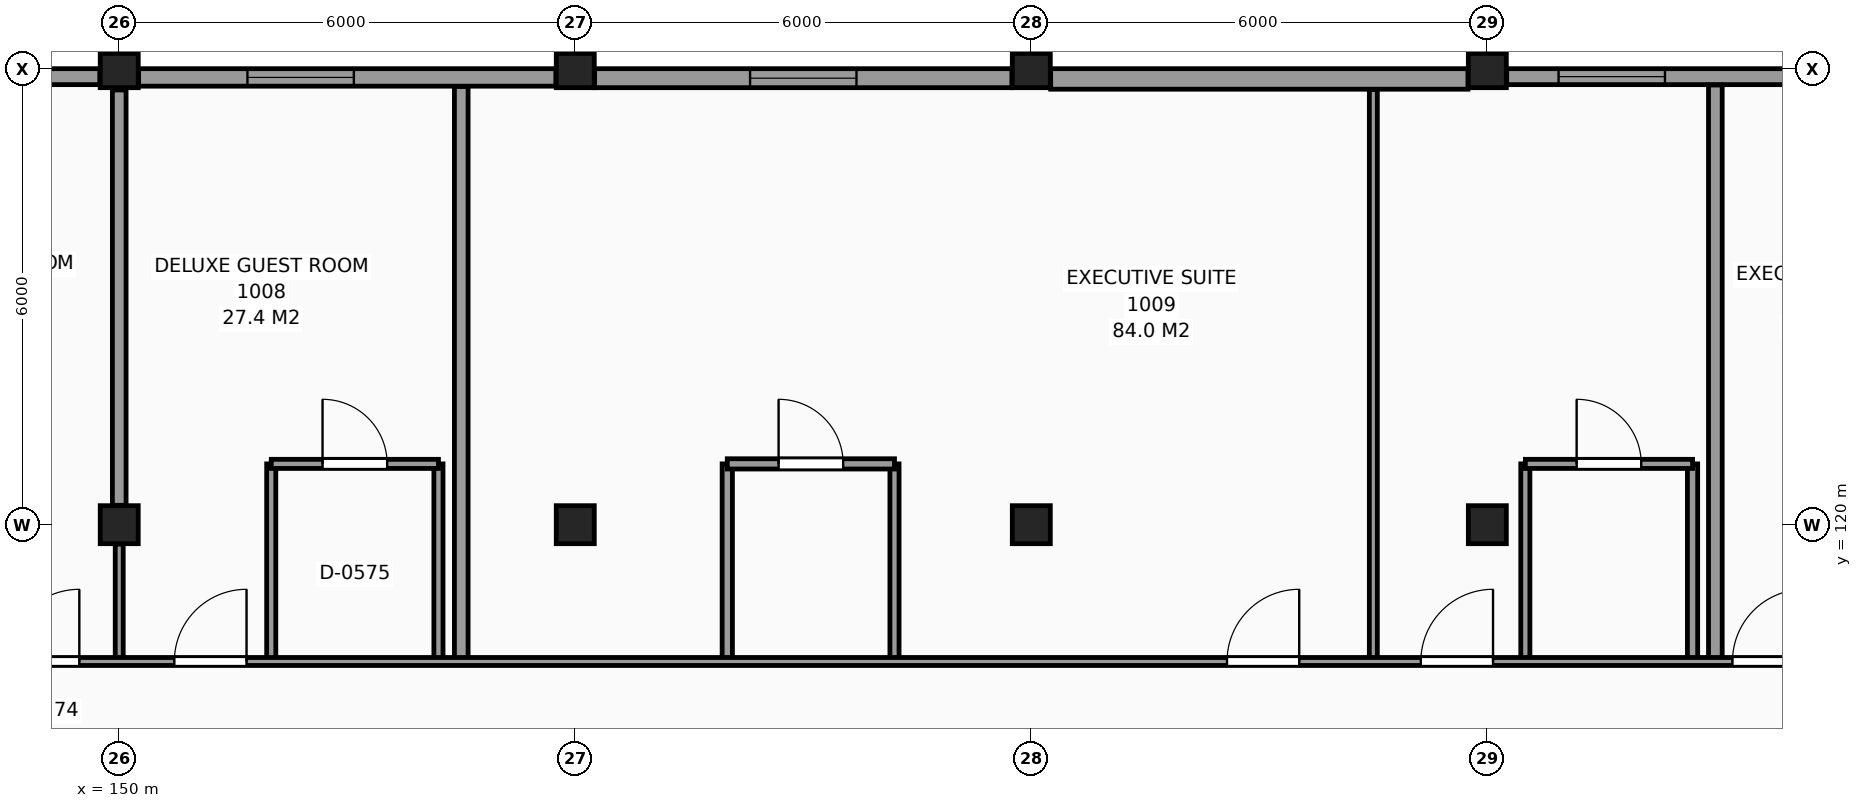
"""IFC4 building model, lengths in metres.
Left out: names, types, materials, properties, quantities, classifications, styles, units other than length and angle.
Written with IfcOpenShell. Run it as: python <this file> out.ifc"""

import sys

from ifc_helpers import new_model, si_unit, direction, frame, frame_2d, origin, origin_2d, place, context, subcontext, project, spatial, rectangle, extrude, element, fill, save


model = new_model("IFC4")
c1 = context("Model", 3, precision=1e-05, world=origin(), true_north=direction((0.0, 1.0)))
c2 = subcontext(c1, "Body", "Model", "MODEL_VIEW")
j1 = project(units=[si_unit("LENGTHUNIT", "METRE"), si_unit("PLANEANGLEUNIT", "RADIAN")], contexts=[c1])
p1 = place(None, origin())
s1 = spatial("IfcSite", under=j1, at=p1, CompositionType="ELEMENT")
p2 = place(p1, origin())
s2 = spatial("IfcBuilding", under=s1, at=p2, CompositionType="ELEMENT")
p3 = place(p2, frame((0.0, 0.0, 41.4)))
s3 = spatial("IfcBuildingStorey", under=s2, at=p3, CompositionType="ELEMENT", Elevation=41.4)
for number, where, z_axis, x_axis in (
    (1, (150.0, 120.0, 0.0), (0.0, 0.0, 1.0), (1.0, 0.0, 0.0)),
    (2, (150.0, 126.0, 0.0), (0.0, 0.0, 1.0), (1.0, 0.0, 0.0)),
    (3, (156.0, 120.0, 0.0), (0.0, 0.0, 1.0), (1.0, 0.0, 0.0)),
    (4, (156.0, 126.0, 0.0), (0.0, 0.0, 1.0), (1.0, 0.0, 0.0)),
    (5, (162.0, 120.0, 0.0), (0.0, 0.0, 1.0), (1.0, 0.0, 0.0)),
    (6, (162.0, 126.0, 0.0), (0.0, 0.0, 1.0), (1.0, 0.0, 0.0)),
    (7, (168.0, 120.0, 0.0), (0.0, 0.0, 1.0), (1.0, 0.0, 0.0)),
    (8, (168.0, 126.0, 0.0), (0.0, 0.0, 1.0), (1.0, 0.0, 0.0)),
):
    element("IfcColumn", number, at=place(p3, frame(where, z_axis=z_axis, x_axis=x_axis)), inside=s3, PredefinedType="COLUMN", context=c2, shape_type="SweptSolid", body=[
        extrude(rectangle(XDim=0.5, YDim=0.5, at=origin_2d()), origin(), (0.0, 0.0, 1.0), 3.3),
    ])
p4 = place(p3, frame((173.745, 125.895, 0.0), z_axis=(0.0, 0.0, 1.0), x_axis=(-1.0, 0.0, 0.0)))
e9 = element("IfcWall", 9, at=p4, inside=s3, PredefinedType="SOLIDWALL", context=c2, shape_type="SweptSolid", body=[
    extrude(rectangle(XDim=5.49, YDim=0.21, at=frame_2d((2.745, 0.0))), origin(), (0.0, 0.0, 1.0), 2.41),
])
p5 = place(p4, frame((3.408, 0.0, 0.8)))
e10 = element("IfcOpeningElement", 10, at=p5, cuts=e9, PredefinedType="OPENING", context=c2, shape_type="SweptSolid", body=[
    extrude(rectangle(XDim=1.4, YDim=1.4, at=frame_2d((0.7, 0.7))), frame((0.0, 0.115, 0.0), z_axis=(0.0, -1.0, 0.0), x_axis=(1.0, 0.0, 0.0)), (0.0, 0.0, 1.0), 0.23),
])
p6 = place(p3, frame((167.745, 125.865, 0.0), z_axis=(0.0, 0.0, 1.0), x_axis=(-1.0, 0.0, 0.0)))
e11 = element("IfcWall", 11, at=p6, inside=s3, PredefinedType="SOLIDWALL", context=c2, shape_type="SweptSolid", body=[
    extrude(rectangle(XDim=5.49, YDim=0.27, at=frame_2d((2.745, 0.0))), origin(), (0.0, 0.0, 1.0), 2.41),
])
p7 = place(p3, frame((161.745, 125.875, 0.0), z_axis=(0.0, 0.0, 1.0), x_axis=(-1.0, 0.0, 0.0)))
e12 = element("IfcWall", 12, at=p7, inside=s3, PredefinedType="SOLIDWALL", context=c2, shape_type="SweptSolid", body=[
    extrude(rectangle(XDim=5.49, YDim=0.25, at=frame_2d((2.745, 0.0))), origin(), (0.0, 0.0, 1.0), 2.41),
])
p8 = place(p7, frame((2.045, 0.0, 0.8)))
e13 = element("IfcOpeningElement", 13, at=p8, cuts=e12, PredefinedType="OPENING", context=c2, shape_type="SweptSolid", body=[
    extrude(rectangle(XDim=1.4, YDim=1.4, at=frame_2d((0.7, 0.7))), frame((0.0, 0.135, 0.0), z_axis=(0.0, -1.0, 0.0), x_axis=(1.0, 0.0, 0.0)), (0.0, 0.0, 1.0), 0.27),
])
p9 = place(p3, frame((155.745, 125.885, 0.0), z_axis=(0.0, 0.0, 1.0), x_axis=(-1.0, 0.0, 0.0)))
e14 = element("IfcWall", 14, at=p9, inside=s3, PredefinedType="SOLIDWALL", context=c2, shape_type="SweptSolid", body=[
    extrude(rectangle(XDim=5.49, YDim=0.23, at=frame_2d((2.745, 0.0))), origin(), (0.0, 0.0, 1.0), 2.41),
])
p10 = place(p9, frame((2.658, 0.0, 0.8)))
e15 = element("IfcOpeningElement", 15, at=p10, cuts=e14, PredefinedType="OPENING", context=c2, shape_type="SweptSolid", body=[
    extrude(rectangle(XDim=1.4, YDim=1.4, at=frame_2d((0.7, 0.7))), frame((0.0, 0.125, 0.0), z_axis=(0.0, -1.0, 0.0), x_axis=(1.0, 0.0, 0.0)), (0.0, 0.0, 1.0), 0.25),
])
p11 = place(p3, frame((149.745, 125.895, 0.0), z_axis=(0.0, 0.0, 1.0), x_axis=(-1.0, 0.0, 0.0)))
e16 = element("IfcWall", 16, at=p11, inside=s3, PredefinedType="SOLIDWALL", context=c2, shape_type="SweptSolid", body=[
    extrude(rectangle(XDim=5.49, YDim=0.21, at=frame_2d((2.745, 0.0))), origin(), (0.0, 0.0, 1.0), 2.41),
])
p12 = place(p11, frame((1.432, 0.0, 0.8)))
e17 = element("IfcOpeningElement", 17, at=p12, cuts=e16, PredefinedType="OPENING", context=c2, shape_type="SweptSolid", body=[
    extrude(rectangle(XDim=1.4, YDim=1.4, at=frame_2d((0.7, 0.7))), frame((0.0, 0.115, 0.0), z_axis=(0.0, -1.0, 0.0), x_axis=(1.0, 0.0, 0.0)), (0.0, 0.0, 1.0), 0.23),
])
p13 = place(p3, frame((150.0, 118.2, 0.0), z_axis=(0.0, 0.0, 1.0), x_axis=(0.0, 1.0, 0.0)))
e18 = element("IfcWall", 18, at=p13, inside=s3, PredefinedType="PARTITIONING", context=c2, shape_type="SweptSolid", body=[
    extrude(rectangle(XDim=1.545, YDim=0.105, at=frame_2d((0.772, 0.0))), origin(), (0.0, 0.0, 1.0), 2.26),
])
p14 = place(p3, frame((150.0, 120.255, 0.0), z_axis=(0.0, 0.0, 1.0), x_axis=(0.0, 1.0, 0.0)))
e19 = element("IfcWall", 19, at=p14, inside=s3, PredefinedType="PARTITIONING", context=c2, shape_type="SweptSolid", body=[
    extrude(rectangle(XDim=5.465, YDim=0.18, at=frame_2d((2.732, 0.0))), origin(), (0.0, 0.0, 1.0), 2.36),
])
for number, where, z_axis, x_axis in (
    (20, (152.0, 118.2, 0.0), (0.0, 0.0, 1.0), (0.0, 1.0, 0.0)),
    (21, (154.2, 118.2, 0.0), (0.0, 0.0, 1.0), (0.0, 1.0, 0.0)),
):
    element("IfcWall", number, at=place(p3, frame(where, z_axis=z_axis, x_axis=x_axis)), inside=s3, PredefinedType="PARTITIONING", context=c2, shape_type="SweptSolid", body=[
        extrude(rectangle(XDim=2.6, YDim=0.12, at=frame_2d((1.3, 0.0))), origin(), (0.0, 0.0, 1.0), 3.06),
    ])
p15 = place(p3, frame((154.5, 118.2, 0.0), z_axis=(0.0, 0.0, 1.0), x_axis=(0.0, 1.0, 0.0)))
e22 = element("IfcWall", 22, at=p15, inside=s3, PredefinedType="PARTITIONING", context=c2, shape_type="SweptSolid", body=[
    extrude(rectangle(XDim=7.565, YDim=0.18, at=frame_2d((3.782, 0.0))), origin(), (0.0, 0.0, 1.0), 3.06),
])
p16 = place(p3, frame((158.0, 118.2, 0.0), z_axis=(0.0, 0.0, 1.0), x_axis=(0.0, 1.0, 0.0)))
e23 = element("IfcWall", 23, at=p16, inside=s3, PredefinedType="PARTITIONING", context=c2, shape_type="SweptSolid", body=[
    extrude(rectangle(XDim=2.6, YDim=0.135, at=frame_2d((1.3, 0.0))), origin(), (0.0, 0.0, 1.0), 3.06),
])
p17 = place(p3, frame((160.2, 118.2, 0.0), z_axis=(0.0, 0.0, 1.0), x_axis=(0.0, 1.0, 0.0)))
e24 = element("IfcWall", 24, at=p17, inside=s3, PredefinedType="PARTITIONING", context=c2, shape_type="SweptSolid", body=[
    extrude(rectangle(XDim=2.6, YDim=0.12, at=frame_2d((1.3, 0.0))), origin(), (0.0, 0.0, 1.0), 3.06),
])
p18 = place(p3, frame((166.5, 118.2, 0.0), z_axis=(0.0, 0.0, 1.0), x_axis=(0.0, 1.0, 0.0)))
e25 = element("IfcWall", 25, at=p18, inside=s3, PredefinedType="PARTITIONING", context=c2, shape_type="SweptSolid", body=[
    extrude(rectangle(XDim=7.525, YDim=0.105, at=frame_2d((3.763, 0.0))), origin(), (0.0, 0.0, 1.0), 3.06),
])
p19 = place(p3, frame((168.5, 118.2, 0.0), z_axis=(0.0, 0.0, 1.0), x_axis=(0.0, 1.0, 0.0)))
e26 = element("IfcWall", 26, at=p19, inside=s3, PredefinedType="PARTITIONING", context=c2, shape_type="SweptSolid", body=[
    extrude(rectangle(XDim=2.6, YDim=0.12, at=frame_2d((1.3, 0.0))), origin(), (0.0, 0.0, 1.0), 3.06),
])
p20 = place(p3, frame((170.7, 118.2, 0.0), z_axis=(0.0, 0.0, 1.0), x_axis=(0.0, 1.0, 0.0)))
e27 = element("IfcWall", 27, at=p20, inside=s3, PredefinedType="PARTITIONING", context=c2, shape_type="SweptSolid", body=[
    extrude(rectangle(XDim=2.6, YDim=0.135, at=frame_2d((1.3, 0.0))), origin(), (0.0, 0.0, 1.0), 3.06),
])
p21 = place(p3, frame((171.0, 118.2, 0.0), z_axis=(0.0, 0.0, 1.0), x_axis=(0.0, 1.0, 0.0)))
e28 = element("IfcWall", 28, at=p21, inside=s3, PredefinedType="PARTITIONING", context=c2, shape_type="SweptSolid", body=[
    extrude(rectangle(XDim=7.585, YDim=0.18, at=frame_2d((3.792, 0.0))), origin(), (0.0, 0.0, 1.0), 3.06),
])
p22 = place(p3, frame((102.275, 118.2, 0.0), z_axis=(0.0, 0.0, 1.0), x_axis=(1.0, 0.0, 0.0)))
e29 = element("IfcWall", 29, at=p22, inside=s3, PredefinedType="PARTITIONING", context=c2, shape_type="SweptSolid", body=[
    extrude(rectangle(XDim=74.225, YDim=0.105, at=frame_2d((37.113, 0.0))), origin(), (0.0, 0.0, 1.0), 3.06),
])
p23 = place(p22, frame((7.55, 0.0, 0.0)))
e30 = element("IfcOpeningElement", 30, at=p23, cuts=e29, PredefinedType="OPENING", context=c2, shape_type="SweptSolid", body=[
    extrude(rectangle(XDim=0.95, YDim=2.1, at=frame_2d((0.475, 1.05))), frame((0.0, 0.062, 0.0), z_axis=(0.0, -1.0, 0.0), x_axis=(1.0, 0.0, 0.0)), (0.0, 0.0, 1.0), 0.125),
])
p24 = place(p22, frame((9.35, 0.0, 0.0)))
e31 = element("IfcOpeningElement", 31, at=p24, cuts=e29, PredefinedType="OPENING", context=c2, shape_type="SweptSolid", body=[
    extrude(rectangle(XDim=0.95, YDim=2.1, at=frame_2d((0.475, 1.05))), frame((0.0, 0.062, 0.0), z_axis=(0.0, -1.0, 0.0), x_axis=(1.0, 0.0, 0.0)), (0.0, 0.0, 1.0), 0.125),
])
p25 = place(p22, frame((24.05, 0.0, 0.0)))
e32 = element("IfcOpeningElement", 32, at=p25, cuts=e29, PredefinedType="OPENING", context=c2, shape_type="SweptSolid", body=[
    extrude(rectangle(XDim=0.95, YDim=2.1, at=frame_2d((0.475, 1.05))), frame((0.0, 0.062, 0.0), z_axis=(0.0, -1.0, 0.0), x_axis=(1.0, 0.0, 0.0)), (0.0, 0.0, 1.0), 0.125),
])
p26 = place(p22, frame((28.25, 0.0, 0.0)))
e33 = element("IfcOpeningElement", 33, at=p26, cuts=e29, PredefinedType="OPENING", context=c2, shape_type="SweptSolid", body=[
    extrude(rectangle(XDim=0.95, YDim=2.1, at=frame_2d((0.475, 1.05))), frame((0.0, 0.062, 0.0), z_axis=(0.0, -1.0, 0.0), x_axis=(1.0, 0.0, 0.0)), (0.0, 0.0, 1.0), 0.125),
])
p27 = place(p22, frame((30.45, 0.0, 0.0)))
e34 = element("IfcOpeningElement", 34, at=p27, cuts=e29, PredefinedType="OPENING", context=c2, shape_type="SweptSolid", body=[
    extrude(rectangle(XDim=0.95, YDim=2.1, at=frame_2d((0.475, 1.05))), frame((0.0, 0.062, 0.0), z_axis=(0.0, -1.0, 0.0), x_axis=(1.0, 0.0, 0.0)), (0.0, 0.0, 1.0), 0.125),
])
p28 = place(p22, frame((36.45, 0.0, 0.0)))
e35 = element("IfcOpeningElement", 35, at=p28, cuts=e29, PredefinedType="OPENING", context=c2, shape_type="SweptSolid", body=[
    extrude(rectangle(XDim=0.95, YDim=2.1, at=frame_2d((0.475, 1.05))), frame((0.0, 0.062, 0.0), z_axis=(0.0, -1.0, 0.0), x_axis=(1.0, 0.0, 0.0)), (0.0, 0.0, 1.0), 0.125),
])
p29 = place(p22, frame((46.25, 0.0, 0.0)))
e36 = element("IfcOpeningElement", 36, at=p29, cuts=e29, PredefinedType="OPENING", context=c2, shape_type="SweptSolid", body=[
    extrude(rectangle(XDim=0.95, YDim=2.1, at=frame_2d((0.475, 1.05))), frame((0.0, 0.062, 0.0), z_axis=(0.0, -1.0, 0.0), x_axis=(1.0, 0.0, 0.0)), (0.0, 0.0, 1.0), 0.125),
])
p30 = place(p22, frame((48.45, 0.0, 0.0)))
e37 = element("IfcOpeningElement", 37, at=p30, cuts=e29, PredefinedType="OPENING", context=c2, shape_type="SweptSolid", body=[
    extrude(rectangle(XDim=0.95, YDim=2.1, at=frame_2d((0.475, 1.05))), frame((0.0, 0.062, 0.0), z_axis=(0.0, -1.0, 0.0), x_axis=(1.0, 0.0, 0.0)), (0.0, 0.0, 1.0), 0.125),
])
p31 = place(p22, frame((62.3, 0.0, 0.0)))
e38 = element("IfcOpeningElement", 38, at=p31, cuts=e29, PredefinedType="OPENING", context=c2, shape_type="SweptSolid", body=[
    extrude(rectangle(XDim=0.95, YDim=2.1, at=frame_2d((0.475, 1.05))), frame((0.0, 0.062, 0.0), z_axis=(0.0, -1.0, 0.0), x_axis=(1.0, 0.0, 0.0)), (0.0, 0.0, 1.0), 0.125),
])
p32 = place(p22, frame((64.85, 0.0, 0.0)))
e39 = element("IfcOpeningElement", 39, at=p32, cuts=e29, PredefinedType="OPENING", context=c2, shape_type="SweptSolid", body=[
    extrude(rectangle(XDim=0.95, YDim=2.1, at=frame_2d((0.475, 1.05))), frame((0.0, 0.062, 0.0), z_axis=(0.0, -1.0, 0.0), x_axis=(1.0, 0.0, 0.0)), (0.0, 0.0, 1.0), 0.125),
])
p33 = place(p22, frame((68.95, 0.0, 0.0)))
e40 = element("IfcOpeningElement", 40, at=p33, cuts=e29, PredefinedType="OPENING", context=c2, shape_type="SweptSolid", body=[
    extrude(rectangle(XDim=0.95, YDim=2.1, at=frame_2d((0.475, 1.05))), frame((0.0, 0.062, 0.0), z_axis=(0.0, -1.0, 0.0), x_axis=(1.0, 0.0, 0.0)), (0.0, 0.0, 1.0), 0.125),
])
p34 = place(p3, frame((152.0, 120.8, 0.0), z_axis=(0.0, 0.0, 1.0), x_axis=(1.0, 0.0, 0.0)))
e41 = element("IfcWall", 41, at=p34, inside=s3, PredefinedType="PARTITIONING", context=c2, shape_type="SweptSolid", body=[
    extrude(rectangle(XDim=2.2, YDim=0.12, at=frame_2d((1.1, 0.0))), origin(), (0.0, 0.0, 1.0), 3.06),
])
p35 = place(p34, frame((0.675, 0.0, 0.0)))
e42 = element("IfcOpeningElement", 42, at=p35, cuts=e41, PredefinedType="OPENING", context=c2, shape_type="SweptSolid", body=[
    extrude(rectangle(XDim=0.85, YDim=2.1, at=frame_2d((0.425, 1.05))), frame((0.0, 0.07, 0.0), z_axis=(0.0, -1.0, 0.0), x_axis=(1.0, 0.0, 0.0)), (0.0, 0.0, 1.0), 0.14),
])
p36 = place(p3, frame((158.0, 120.8, 0.0), z_axis=(0.0, 0.0, 1.0), x_axis=(1.0, 0.0, 0.0)))
e43 = element("IfcWall", 43, at=p36, inside=s3, PredefinedType="PARTITIONING", context=c2, shape_type="SweptSolid", body=[
    extrude(rectangle(XDim=2.2, YDim=0.135, at=frame_2d((1.1, 0.0))), origin(), (0.0, 0.0, 1.0), 3.06),
])
p37 = place(p36, frame((0.675, 0.0, 0.0)))
e44 = element("IfcOpeningElement", 44, at=p37, cuts=e43, PredefinedType="OPENING", context=c2, shape_type="SweptSolid", body=[
    extrude(rectangle(XDim=0.85, YDim=2.1, at=frame_2d((0.425, 1.05))), frame((0.0, 0.078, 0.0), z_axis=(0.0, -1.0, 0.0), x_axis=(1.0, 0.0, 0.0)), (0.0, 0.0, 1.0), 0.155),
])
p38 = place(p3, frame((168.5, 120.8, 0.0), z_axis=(0.0, 0.0, 1.0), x_axis=(1.0, 0.0, 0.0)))
e45 = element("IfcWall", 45, at=p38, inside=s3, PredefinedType="PARTITIONING", context=c2, shape_type="SweptSolid", body=[
    extrude(rectangle(XDim=2.2, YDim=0.12, at=frame_2d((1.1, 0.0))), origin(), (0.0, 0.0, 1.0), 3.06),
])
p39 = place(p38, frame((0.675, 0.0, 0.0)))
e46 = element("IfcOpeningElement", 46, at=p39, cuts=e45, PredefinedType="OPENING", context=c2, shape_type="SweptSolid", body=[
    extrude(rectangle(XDim=0.85, YDim=2.1, at=frame_2d((0.425, 1.05))), frame((0.0, 0.07, 0.0), z_axis=(0.0, -1.0, 0.0), x_axis=(1.0, 0.0, 0.0)), (0.0, 0.0, 1.0), 0.14),
])
p40 = place(p10, origin())
e47 = element("IfcWindow", 47, at=p40, inside=s3, PartitioningType="SINGLE_PANEL", PredefinedType="WINDOW", context=c2, shape_type="SweptSolid", body=[
    extrude(rectangle(XDim=1.4, YDim=1.4, at=frame_2d((0.7, 0.7))), frame((0.0, 0.03, 0.0), z_axis=(0.0, -1.0, 0.0), x_axis=(1.0, 0.0, 0.0)), (0.0, 0.0, 1.0), 0.06),
])
fill(e15, e47)
p41 = place(p8, origin())
e48 = element("IfcWindow", 48, at=p41, inside=s3, PartitioningType="SINGLE_PANEL", PredefinedType="WINDOW", context=c2, shape_type="SweptSolid", body=[
    extrude(rectangle(XDim=1.4, YDim=1.4, at=frame_2d((0.7, 0.7))), frame((0.0, 0.03, 0.0), z_axis=(0.0, -1.0, 0.0), x_axis=(1.0, 0.0, 0.0)), (0.0, 0.0, 1.0), 0.06),
])
fill(e13, e48)
p42 = place(p5, origin())
e49 = element("IfcWindow", 49, at=p42, inside=s3, PartitioningType="SINGLE_PANEL", PredefinedType="WINDOW", context=c2, shape_type="SweptSolid", body=[
    extrude(rectangle(XDim=1.4, YDim=1.4, at=frame_2d((0.7, 0.7))), frame((0.0, 0.03, 0.0), z_axis=(0.0, -1.0, 0.0), x_axis=(1.0, 0.0, 0.0)), (0.0, 0.0, 1.0), 0.06),
])
fill(e10, e49)
p43 = place(p29, origin())
e50 = element("IfcDoor", 50, at=p43, inside=s3, OperationType="SINGLE_SWING_RIGHT", PredefinedType="DOOR", context=c2, shape_type="SweptSolid", body=[
    extrude(rectangle(XDim=0.95, YDim=2.1, at=frame_2d((0.475, 1.05))), frame((0.0, 0.025, 0.0), z_axis=(0.0, -1.0, 0.0), x_axis=(1.0, 0.0, 0.0)), (0.0, 0.0, 1.0), 0.05),
])
fill(e36, e50)
p44 = place(p35, origin())
e51 = element("IfcDoor", 51, at=p44, inside=s3, OperationType="SINGLE_SWING_LEFT", PredefinedType="DOOR", context=c2, shape_type="SweptSolid", body=[
    extrude(rectangle(XDim=0.85, YDim=2.1, at=frame_2d((0.425, 1.05))), frame((0.0, 0.025, 0.0), z_axis=(0.0, -1.0, 0.0), x_axis=(1.0, 0.0, 0.0)), (0.0, 0.0, 1.0), 0.05),
])
fill(e42, e51)
p45 = place(p30, origin())
e52 = element("IfcDoor", 52, at=p45, inside=s3, OperationType="SINGLE_SWING_RIGHT", PredefinedType="DOOR", context=c2, shape_type="SweptSolid", body=[
    extrude(rectangle(XDim=0.95, YDim=2.1, at=frame_2d((0.475, 1.05))), frame((0.0, 0.025, 0.0), z_axis=(0.0, -1.0, 0.0), x_axis=(1.0, 0.0, 0.0)), (0.0, 0.0, 1.0), 0.05),
])
fill(e37, e52)
p46 = place(p37, origin())
e53 = element("IfcDoor", 53, at=p46, inside=s3, OperationType="SINGLE_SWING_LEFT", PredefinedType="DOOR", context=c2, shape_type="SweptSolid", body=[
    extrude(rectangle(XDim=0.85, YDim=2.1, at=frame_2d((0.425, 1.05))), frame((0.0, 0.025, 0.0), z_axis=(0.0, -1.0, 0.0), x_axis=(1.0, 0.0, 0.0)), (0.0, 0.0, 1.0), 0.05),
])
fill(e44, e53)
p47 = place(p31, origin())
e54 = element("IfcDoor", 54, at=p47, inside=s3, OperationType="SINGLE_SWING_RIGHT", PredefinedType="DOOR", context=c2, shape_type="SweptSolid", body=[
    extrude(rectangle(XDim=0.95, YDim=2.1, at=frame_2d((0.475, 1.05))), frame((0.0, 0.025, 0.0), z_axis=(0.0, -1.0, 0.0), x_axis=(1.0, 0.0, 0.0)), (0.0, 0.0, 1.0), 0.05),
])
fill(e38, e54)
p48 = place(p39, origin())
e55 = element("IfcDoor", 55, at=p48, inside=s3, OperationType="SINGLE_SWING_LEFT", PredefinedType="DOOR", context=c2, shape_type="SweptSolid", body=[
    extrude(rectangle(XDim=0.85, YDim=2.1, at=frame_2d((0.425, 1.05))), frame((0.0, 0.025, 0.0), z_axis=(0.0, -1.0, 0.0), x_axis=(1.0, 0.0, 0.0)), (0.0, 0.0, 1.0), 0.05),
])
fill(e46, e55)
p49 = place(p32, origin())
e56 = element("IfcDoor", 56, at=p49, inside=s3, OperationType="SINGLE_SWING_RIGHT", PredefinedType="DOOR", context=c2, shape_type="SweptSolid", body=[
    extrude(rectangle(XDim=0.95, YDim=2.1, at=frame_2d((0.475, 1.05))), frame((0.0, 0.025, 0.0), z_axis=(0.0, -1.0, 0.0), x_axis=(1.0, 0.0, 0.0)), (0.0, 0.0, 1.0), 0.05),
])
fill(e39, e56)
p50 = place(p33, origin())
e57 = element("IfcDoor", 57, at=p50, inside=s3, OperationType="SINGLE_SWING_RIGHT", PredefinedType="DOOR", context=c2, shape_type="SweptSolid", body=[
    extrude(rectangle(XDim=0.95, YDim=2.1, at=frame_2d((0.475, 1.05))), frame((0.0, 0.025, 0.0), z_axis=(0.0, -1.0, 0.0), x_axis=(1.0, 0.0, 0.0)), (0.0, 0.0, 1.0), 0.05),
])
fill(e40, e57)
save(model, sys.argv[1])
